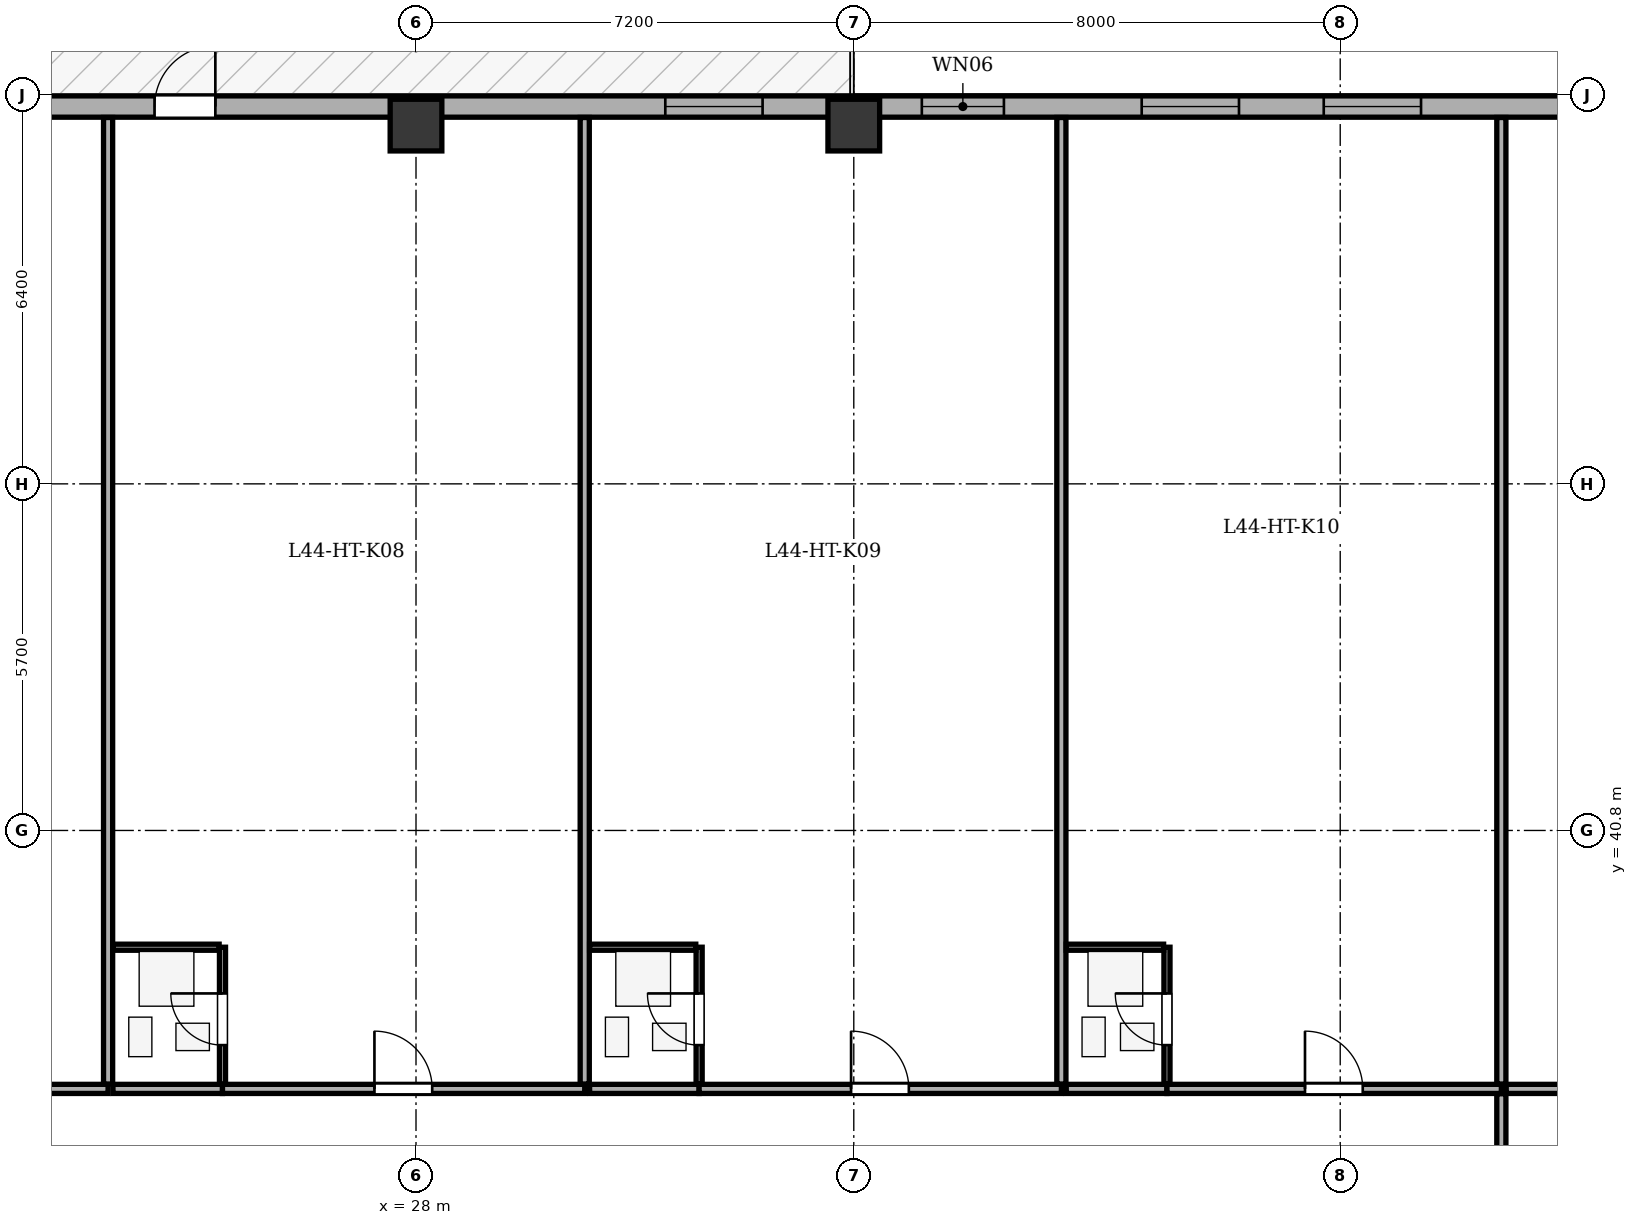
"""IFC4 building model, lengths in metres.
Left out: names, types, materials, properties, quantities, classifications, styles, units other than length and angle.
Written with IfcOpenShell. Run it as: python <this file> out.ifc"""

import sys

from ifc_helpers import new_model, si_unit, direction, frame, frame_2d, origin, origin_2d, place, context, subcontext, project, spatial, rectangle, extrude, element, fill, save


model = new_model("IFC4")
c1 = context("Model", 3, precision=1e-05, world=origin(), true_north=direction((0.0, 1.0)))
c2 = subcontext(c1, "Body", "Model", "MODEL_VIEW")
j1 = project(units=[si_unit("LENGTHUNIT", "METRE"), si_unit("PLANEANGLEUNIT", "RADIAN")], contexts=[c1])
p1 = place(None, origin())
s1 = spatial("IfcSite", under=j1, at=p1, CompositionType="ELEMENT")
p2 = place(p1, origin())
s2 = spatial("IfcBuilding", under=s1, at=p2, CompositionType="ELEMENT")
p3 = place(p2, frame((0.0, 0.0, 172.8)))
s3 = spatial("IfcBuildingStorey", under=s2, at=p3, CompositionType="ELEMENT", Elevation=172.8)
for number, where, z_axis, x_axis in (
    (1, (28.0, 52.4, 0.0), (0.0, 0.0, 1.0), (1.0, 0.0, 0.0)),
    (2, (35.2, 52.4, 0.0), (0.0, 0.0, 1.0), (1.0, 0.0, 0.0)),
):
    element("IfcColumn", number, at=place(p3, frame(where, z_axis=z_axis, x_axis=x_axis)), inside=s3, PredefinedType="COLUMN", context=c2, shape_type="SweptSolid", body=[
        extrude(rectangle(XDim=0.85, YDim=0.85, at=origin_2d()), origin(), (0.0, 0.0, 1.0), 3.5),
    ])
p4 = place(p3, frame((15.7, 52.705, 0.0), z_axis=(0.0, 0.0, 1.0), x_axis=(1.0, 0.0, 0.0)))
e3 = element("IfcWall", 3, at=p4, inside=s3, PredefinedType="STANDARD", context=c2, shape_type="SweptSolid", body=[
    extrude(rectangle(XDim=35.0, YDim=0.35, at=frame_2d((17.5, 0.0))), origin(), (0.0, 0.0, 1.0), 2.785),
])
p5 = place(p4, frame((8.0, 0.0, 0.0)))
e4 = element("IfcOpeningElement", 4, at=p5, cuts=e3, PredefinedType="OPENING", context=c2, shape_type="SweptSolid", body=[
    extrude(rectangle(XDim=1.0, YDim=2.02, at=frame_2d((0.5, 1.01))), frame((0.0, 0.185, 0.0), z_axis=(0.0, -1.0, 0.0), x_axis=(1.0, 0.0, 0.0)), (0.0, 0.0, 1.0), 0.37),
])
p6 = place(p4, frame((1.8, 0.0, 0.75)))
e5 = element("IfcOpeningElement", 5, at=p6, cuts=e3, PredefinedType="OPENING", context=c2, shape_type="SweptSolid", body=[
    extrude(rectangle(XDim=1.6, YDim=1.75, at=frame_2d((0.8, 0.875))), frame((0.0, 0.185, 0.0), z_axis=(0.0, -1.0, 0.0), x_axis=(1.0, 0.0, 0.0)), (0.0, 0.0, 1.0), 0.37),
])
p7 = place(p4, frame((16.4, 0.0, 0.75)))
e6 = element("IfcOpeningElement", 6, at=p7, cuts=e3, PredefinedType="OPENING", context=c2, shape_type="SweptSolid", body=[
    extrude(rectangle(XDim=1.6, YDim=1.75, at=frame_2d((0.8, 0.875))), frame((0.0, 0.185, 0.0), z_axis=(0.0, -1.0, 0.0), x_axis=(1.0, 0.0, 0.0)), (0.0, 0.0, 1.0), 0.37),
])
p8 = place(p4, frame((20.619, 0.0, 0.75)))
e7 = element("IfcOpeningElement", 7, at=p8, cuts=e3, PredefinedType="OPENING", context=c2, shape_type="SweptSolid", body=[
    extrude(rectangle(XDim=1.35, YDim=1.75, at=frame_2d((0.675, 0.875))), frame((0.0, 0.185, 0.0), z_axis=(0.0, -1.0, 0.0), x_axis=(1.0, 0.0, 0.0)), (0.0, 0.0, 1.0), 0.37),
])
p9 = place(p4, frame((24.235, 0.0, 0.75)))
e8 = element("IfcOpeningElement", 8, at=p9, cuts=e3, PredefinedType="OPENING", context=c2, shape_type="SweptSolid", body=[
    extrude(rectangle(XDim=1.6, YDim=1.75, at=frame_2d((0.8, 0.875))), frame((0.0, 0.185, 0.0), z_axis=(0.0, -1.0, 0.0), x_axis=(1.0, 0.0, 0.0)), (0.0, 0.0, 1.0), 0.37),
])
p10 = place(p4, frame((27.229, 0.0, 0.75)))
e9 = element("IfcOpeningElement", 9, at=p10, cuts=e3, PredefinedType="OPENING", context=c2, shape_type="SweptSolid", body=[
    extrude(rectangle(XDim=1.6, YDim=1.75, at=frame_2d((0.8, 0.875))), frame((0.0, 0.185, 0.0), z_axis=(0.0, -1.0, 0.0), x_axis=(1.0, 0.0, 0.0)), (0.0, 0.0, 1.0), 0.37),
])
p11 = place(p4, frame((31.637, 0.0, 0.75)))
e10 = element("IfcOpeningElement", 10, at=p11, cuts=e3, PredefinedType="OPENING", context=c2, shape_type="SweptSolid", body=[
    extrude(rectangle(XDim=1.6, YDim=1.75, at=frame_2d((0.8, 0.875))), frame((0.0, 0.185, 0.0), z_axis=(0.0, -1.0, 0.0), x_axis=(1.0, 0.0, 0.0)), (0.0, 0.0, 1.0), 0.37),
])
p12 = place(p3, frame((17.437, 36.55, 0.0), z_axis=(0.0, 0.0, 1.0), x_axis=(1.0, 0.0, 0.0)))
e11 = element("IfcWall", 11, at=p12, inside=s3, PredefinedType="PARTITIONING", context=c2, shape_type="SweptSolid", body=[
    extrude(rectangle(XDim=5.5, YDim=0.15, at=frame_2d((2.75, 0.0))), origin(), (0.0, 0.0, 1.0), 3.2),
])
p13 = place(p12, frame((2.27, 0.0, 0.0)))
e12 = element("IfcOpeningElement", 12, at=p13, cuts=e11, PredefinedType="OPENING", context=c2, shape_type="SweptSolid", body=[
    extrude(rectangle(XDim=0.95, YDim=2.1, at=frame_2d((0.475, 1.05))), frame((0.0, 0.085, 0.0), z_axis=(0.0, -1.0, 0.0), x_axis=(1.0, 0.0, 0.0)), (0.0, 0.0, 1.0), 0.17),
])
p14 = place(p3, frame((22.936, 36.63, 0.0), z_axis=(0.0, 0.0, 1.0), x_axis=(0.0, 1.0, 0.0)))
e13 = element("IfcWall", 13, at=p14, inside=s3, PredefinedType="PARTITIONING", context=c2, shape_type="SweptSolid", body=[
    extrude(rectangle(XDim=15.895, YDim=0.15, at=frame_2d((7.948, 0.0))), origin(), (0.0, 0.0, 1.0), 3.2),
])
p15 = place(p3, frame((23.016, 36.55, 0.0), z_axis=(0.0, 0.0, 1.0), x_axis=(1.0, 0.0, 0.0)))
e14 = element("IfcWall", 14, at=p15, inside=s3, PredefinedType="PARTITIONING", context=c2, shape_type="SweptSolid", body=[
    extrude(rectangle(XDim=1.801, YDim=0.15, at=frame_2d((0.901, 0.0))), origin(), (0.0, 0.0, 1.0), 3.2),
])
p16 = place(p3, frame((24.817, 36.55, 0.0), z_axis=(0.0, 0.0, 1.0), x_axis=(1.0, 0.0, 0.0)))
e15 = element("IfcWall", 15, at=p16, inside=s3, PredefinedType="PARTITIONING", context=c2, shape_type="SweptSolid", body=[
    extrude(rectangle(XDim=5.958, YDim=0.15, at=frame_2d((2.979, 0.0))), origin(), (0.0, 0.0, 1.0), 3.2),
])
p17 = place(p16, frame((2.499, 0.0, 0.0)))
e16 = element("IfcOpeningElement", 16, at=p17, cuts=e15, PredefinedType="OPENING", context=c2, shape_type="SweptSolid", body=[
    extrude(rectangle(XDim=0.95, YDim=2.1, at=frame_2d((0.475, 1.05))), frame((0.0, 0.085, 0.0), z_axis=(0.0, -1.0, 0.0), x_axis=(1.0, 0.0, 0.0)), (0.0, 0.0, 1.0), 0.17),
])
p18 = place(p3, frame((24.817, 36.63, 0.0), z_axis=(0.0, 0.0, 1.0), x_axis=(0.0, 1.0, 0.0)))
e17 = element("IfcWall", 17, at=p18, inside=s3, PredefinedType="PARTITIONING", context=c2, shape_type="SweptSolid", body=[
    extrude(rectangle(XDim=2.25, YDim=0.1, at=frame_2d((1.125, 0.0))), origin(), (0.0, 0.0, 1.0), 3.2),
])
p19 = place(p18, frame((0.64, 0.0, 0.0)))
e18 = element("IfcOpeningElement", 18, at=p19, cuts=e17, PredefinedType="OPENING", context=c2, shape_type="SweptSolid", body=[
    extrude(rectangle(XDim=0.85, YDim=2.05, at=frame_2d((0.425, 1.025))), frame((0.0, 0.06, 0.0), z_axis=(0.0, -1.0, 0.0), x_axis=(1.0, 0.0, 0.0)), (0.0, 0.0, 1.0), 0.12),
])
p20 = place(p3, frame((23.016, 38.88, 0.0), z_axis=(0.0, 0.0, 1.0), x_axis=(1.0, 0.0, 0.0)))
e19 = element("IfcWall", 19, at=p20, inside=s3, PredefinedType="PARTITIONING", context=c2, shape_type="SweptSolid", body=[
    extrude(rectangle(XDim=1.746, YDim=0.1, at=frame_2d((0.873, 0.0))), origin(), (0.0, 0.0, 1.0), 3.2),
])
p21 = place(p3, frame((30.775, 36.63, 0.0), z_axis=(0.0, 0.0, 1.0), x_axis=(0.0, 1.0, 0.0)))
e20 = element("IfcWall", 20, at=p21, inside=s3, PredefinedType="PARTITIONING", context=c2, shape_type="SweptSolid", body=[
    extrude(rectangle(XDim=15.895, YDim=0.15, at=frame_2d((7.948, 0.0))), origin(), (0.0, 0.0, 1.0), 3.2),
])
p22 = place(p3, frame((30.855, 36.55, 0.0), z_axis=(0.0, 0.0, 1.0), x_axis=(1.0, 0.0, 0.0)))
e21 = element("IfcWall", 21, at=p22, inside=s3, PredefinedType="PARTITIONING", context=c2, shape_type="SweptSolid", body=[
    extrude(rectangle(XDim=1.802, YDim=0.15, at=frame_2d((0.901, 0.0))), origin(), (0.0, 0.0, 1.0), 3.2),
])
p23 = place(p3, frame((32.656, 36.55, 0.0), z_axis=(0.0, 0.0, 1.0), x_axis=(1.0, 0.0, 0.0)))
e22 = element("IfcWall", 22, at=p23, inside=s3, PredefinedType="PARTITIONING", context=c2, shape_type="SweptSolid", body=[
    extrude(rectangle(XDim=5.958, YDim=0.15, at=frame_2d((2.979, 0.0))), origin(), (0.0, 0.0, 1.0), 3.2),
])
p24 = place(p23, frame((2.499, 0.0, 0.0)))
e23 = element("IfcOpeningElement", 23, at=p24, cuts=e22, PredefinedType="OPENING", context=c2, shape_type="SweptSolid", body=[
    extrude(rectangle(XDim=0.95, YDim=2.1, at=frame_2d((0.475, 1.05))), frame((0.0, 0.085, 0.0), z_axis=(0.0, -1.0, 0.0), x_axis=(1.0, 0.0, 0.0)), (0.0, 0.0, 1.0), 0.17),
])
p25 = place(p3, frame((32.656, 36.63, 0.0), z_axis=(0.0, 0.0, 1.0), x_axis=(0.0, 1.0, 0.0)))
e24 = element("IfcWall", 24, at=p25, inside=s3, PredefinedType="PARTITIONING", context=c2, shape_type="SweptSolid", body=[
    extrude(rectangle(XDim=2.25, YDim=0.1, at=frame_2d((1.125, 0.0))), origin(), (0.0, 0.0, 1.0), 3.2),
])
p26 = place(p25, frame((0.64, 0.0, 0.0)))
e25 = element("IfcOpeningElement", 25, at=p26, cuts=e24, PredefinedType="OPENING", context=c2, shape_type="SweptSolid", body=[
    extrude(rectangle(XDim=0.85, YDim=2.05, at=frame_2d((0.425, 1.025))), frame((0.0, 0.06, 0.0), z_axis=(0.0, -1.0, 0.0), x_axis=(1.0, 0.0, 0.0)), (0.0, 0.0, 1.0), 0.12),
])
p27 = place(p3, frame((30.855, 38.88, 0.0), z_axis=(0.0, 0.0, 1.0), x_axis=(1.0, 0.0, 0.0)))
e26 = element("IfcWall", 26, at=p27, inside=s3, PredefinedType="PARTITIONING", context=c2, shape_type="SweptSolid", body=[
    extrude(rectangle(XDim=1.746, YDim=0.1, at=frame_2d((0.873, 0.0))), origin(), (0.0, 0.0, 1.0), 3.2),
])
p28 = place(p3, frame((38.614, 36.63, 0.0), z_axis=(0.0, 0.0, 1.0), x_axis=(0.0, 1.0, 0.0)))
e27 = element("IfcWall", 27, at=p28, inside=s3, PredefinedType="PARTITIONING", context=c2, shape_type="SweptSolid", body=[
    extrude(rectangle(XDim=15.895, YDim=0.15, at=frame_2d((7.948, 0.0))), origin(), (0.0, 0.0, 1.0), 3.2),
])
p29 = place(p3, frame((38.694, 36.55, 0.0), z_axis=(0.0, 0.0, 1.0), x_axis=(1.0, 0.0, 0.0)))
e28 = element("IfcWall", 28, at=p29, inside=s3, PredefinedType="PARTITIONING", context=c2, shape_type="SweptSolid", body=[
    extrude(rectangle(XDim=1.656, YDim=0.15, at=frame_2d((0.828, 0.0))), origin(), (0.0, 0.0, 1.0), 3.2),
])
p30 = place(p3, frame((40.351, 36.55, 0.0), z_axis=(0.0, 0.0, 1.0), x_axis=(1.0, 0.0, 0.0)))
e29 = element("IfcWall", 29, at=p30, inside=s3, PredefinedType="PARTITIONING", context=c2, shape_type="SweptSolid", body=[
    extrude(rectangle(XDim=5.5, YDim=0.15, at=frame_2d((2.75, 0.0))), origin(), (0.0, 0.0, 1.0), 3.2),
])
p31 = place(p30, frame((2.27, 0.0, 0.0)))
e30 = element("IfcOpeningElement", 30, at=p31, cuts=e29, PredefinedType="OPENING", context=c2, shape_type="SweptSolid", body=[
    extrude(rectangle(XDim=0.95, YDim=2.1, at=frame_2d((0.475, 1.05))), frame((0.0, 0.085, 0.0), z_axis=(0.0, -1.0, 0.0), x_axis=(1.0, 0.0, 0.0)), (0.0, 0.0, 1.0), 0.17),
])
p32 = place(p3, frame((40.351, 36.63, 0.0), z_axis=(0.0, 0.0, 1.0), x_axis=(0.0, 1.0, 0.0)))
e31 = element("IfcWall", 31, at=p32, inside=s3, PredefinedType="PARTITIONING", context=c2, shape_type="SweptSolid", body=[
    extrude(rectangle(XDim=2.25, YDim=0.1, at=frame_2d((1.125, 0.0))), origin(), (0.0, 0.0, 1.0), 3.2),
])
p33 = place(p32, frame((0.64, 0.0, 0.0)))
e32 = element("IfcOpeningElement", 32, at=p33, cuts=e31, PredefinedType="OPENING", context=c2, shape_type="SweptSolid", body=[
    extrude(rectangle(XDim=0.85, YDim=2.05, at=frame_2d((0.425, 1.025))), frame((0.0, 0.06, 0.0), z_axis=(0.0, -1.0, 0.0), x_axis=(1.0, 0.0, 0.0)), (0.0, 0.0, 1.0), 0.12),
])
p34 = place(p3, frame((38.694, 38.88, 0.0), z_axis=(0.0, 0.0, 1.0), x_axis=(1.0, 0.0, 0.0)))
e33 = element("IfcWall", 33, at=p34, inside=s3, PredefinedType="PARTITIONING", context=c2, shape_type="SweptSolid", body=[
    extrude(rectangle(XDim=1.602, YDim=0.1, at=frame_2d((0.801, 0.0))), origin(), (0.0, 0.0, 1.0), 3.2),
])
p35 = place(p3, frame((45.85, 36.63, 0.0), z_axis=(0.0, 0.0, 1.0), x_axis=(0.0, 1.0, 0.0)))
e34 = element("IfcWall", 34, at=p35, inside=s3, PredefinedType="PARTITIONING", context=c2, shape_type="SweptSolid", body=[
    extrude(rectangle(XDim=15.895, YDim=0.15, at=frame_2d((7.948, 0.0))), origin(), (0.0, 0.0, 1.0), 3.2),
])
p36 = place(p3, frame((45.93, 36.55, 0.0), z_axis=(0.0, 0.0, 1.0), x_axis=(1.0, 0.0, 0.0)))
e35 = element("IfcWall", 35, at=p36, inside=s3, PredefinedType="PARTITIONING", context=c2, shape_type="SweptSolid", body=[
    extrude(rectangle(XDim=9.395, YDim=0.15, at=frame_2d((4.698, 0.0))), origin(), (0.0, 0.0, 1.0), 3.2),
])
p37 = place(p3, frame((45.85, 30.08, 0.0), z_axis=(0.0, 0.0, 1.0), x_axis=(0.0, 1.0, 0.0)))
e36 = element("IfcWall", 36, at=p37, inside=s3, PredefinedType="PARTITIONING", context=c2, shape_type="SweptSolid", body=[
    extrude(rectangle(XDim=6.39, YDim=0.15, at=frame_2d((3.195, 0.0))), origin(), (0.0, 0.0, 1.0), 3.2),
])
p38 = place(p37, frame((2.715, 0.0, 0.0)))
e37 = element("IfcOpeningElement", 37, at=p38, cuts=e36, PredefinedType="OPENING", context=c2, shape_type="SweptSolid", body=[
    extrude(rectangle(XDim=0.95, YDim=2.1, at=frame_2d((0.475, 1.05))), frame((0.0, 0.085, 0.0), z_axis=(0.0, -1.0, 0.0), x_axis=(1.0, 0.0, 0.0)), (0.0, 0.0, 1.0), 0.17),
])
p39 = place(p5, origin())
e38 = element("IfcDoor", 38, at=p39, inside=s3, OperationType="SINGLE_SWING_RIGHT", PredefinedType="DOOR", context=c2, shape_type="SweptSolid", body=[
    extrude(rectangle(XDim=1.0, YDim=2.02, at=frame_2d((0.5, 1.01))), frame((0.0, 0.025, 0.0), z_axis=(0.0, -1.0, 0.0), x_axis=(1.0, 0.0, 0.0)), (0.0, 0.0, 1.0), 0.05),
])
fill(e4, e38)
p40 = place(p7, origin())
e39 = element("IfcWindow", 39, at=p40, inside=s3, PartitioningType="SINGLE_PANEL", PredefinedType="WINDOW", context=c2, shape_type="SweptSolid", body=[
    extrude(rectangle(XDim=1.6, YDim=1.75, at=frame_2d((0.8, 0.875))), frame((0.0, -0.01, 0.0), z_axis=(0.0, -1.0, 0.0), x_axis=(1.0, 0.0, 0.0)), (0.0, 0.0, 1.0), 0.06),
])
fill(e6, e39)
p41 = place(p8, origin())
e40 = element("IfcWindow", 40, at=p41, inside=s3, PartitioningType="SINGLE_PANEL", PredefinedType="WINDOW", context=c2, shape_type="SweptSolid", body=[
    extrude(rectangle(XDim=1.35, YDim=1.75, at=frame_2d((0.675, 0.875))), frame((0.0, -0.01, 0.0), z_axis=(0.0, -1.0, 0.0), x_axis=(1.0, 0.0, 0.0)), (0.0, 0.0, 1.0), 0.06),
])
fill(e7, e40)
p42 = place(p9, origin())
e41 = element("IfcWindow", 41, at=p42, inside=s3, PartitioningType="SINGLE_PANEL", PredefinedType="WINDOW", context=c2, shape_type="SweptSolid", body=[
    extrude(rectangle(XDim=1.6, YDim=1.75, at=frame_2d((0.8, 0.875))), frame((0.0, -0.01, 0.0), z_axis=(0.0, -1.0, 0.0), x_axis=(1.0, 0.0, 0.0)), (0.0, 0.0, 1.0), 0.06),
])
fill(e8, e41)
p43 = place(p10, origin())
e42 = element("IfcWindow", 42, at=p43, inside=s3, PartitioningType="SINGLE_PANEL", PredefinedType="WINDOW", context=c2, shape_type="SweptSolid", body=[
    extrude(rectangle(XDim=1.6, YDim=1.75, at=frame_2d((0.8, 0.875))), frame((0.0, -0.01, 0.0), z_axis=(0.0, -1.0, 0.0), x_axis=(1.0, 0.0, 0.0)), (0.0, 0.0, 1.0), 0.06),
])
fill(e9, e42)
p44 = place(p19, origin())
e43 = element("IfcDoor", 43, at=p44, inside=s3, OperationType="SINGLE_SWING_RIGHT", PredefinedType="DOOR", context=c2, shape_type="SweptSolid", body=[
    extrude(rectangle(XDim=0.85, YDim=2.05, at=frame_2d((0.425, 1.025))), frame((0.0, 0.025, 0.0), z_axis=(0.0, -1.0, 0.0), x_axis=(1.0, 0.0, 0.0)), (0.0, 0.0, 1.0), 0.05),
])
fill(e18, e43)
p45 = place(p17, origin())
e44 = element("IfcDoor", 44, at=p45, inside=s3, OperationType="SINGLE_SWING_LEFT", PredefinedType="DOOR", context=c2, shape_type="SweptSolid", body=[
    extrude(rectangle(XDim=0.95, YDim=2.1, at=frame_2d((0.475, 1.05))), frame((0.0, 0.025, 0.0), z_axis=(0.0, -1.0, 0.0), x_axis=(1.0, 0.0, 0.0)), (0.0, 0.0, 1.0), 0.05),
])
fill(e16, e44)
p46 = place(p26, origin())
e45 = element("IfcDoor", 45, at=p46, inside=s3, OperationType="SINGLE_SWING_RIGHT", PredefinedType="DOOR", context=c2, shape_type="SweptSolid", body=[
    extrude(rectangle(XDim=0.85, YDim=2.05, at=frame_2d((0.425, 1.025))), frame((0.0, 0.025, 0.0), z_axis=(0.0, -1.0, 0.0), x_axis=(1.0, 0.0, 0.0)), (0.0, 0.0, 1.0), 0.05),
])
fill(e25, e45)
p47 = place(p24, origin())
e46 = element("IfcDoor", 46, at=p47, inside=s3, OperationType="SINGLE_SWING_LEFT", PredefinedType="DOOR", context=c2, shape_type="SweptSolid", body=[
    extrude(rectangle(XDim=0.95, YDim=2.1, at=frame_2d((0.475, 1.05))), frame((0.0, 0.025, 0.0), z_axis=(0.0, -1.0, 0.0), x_axis=(1.0, 0.0, 0.0)), (0.0, 0.0, 1.0), 0.05),
])
fill(e23, e46)
p48 = place(p33, origin())
e47 = element("IfcDoor", 47, at=p48, inside=s3, OperationType="SINGLE_SWING_RIGHT", PredefinedType="DOOR", context=c2, shape_type="SweptSolid", body=[
    extrude(rectangle(XDim=0.85, YDim=2.05, at=frame_2d((0.425, 1.025))), frame((0.0, 0.025, 0.0), z_axis=(0.0, -1.0, 0.0), x_axis=(1.0, 0.0, 0.0)), (0.0, 0.0, 1.0), 0.05),
])
fill(e32, e47)
p49 = place(p31, origin())
e48 = element("IfcDoor", 48, at=p49, inside=s3, OperationType="SINGLE_SWING_LEFT", PredefinedType="DOOR", context=c2, shape_type="SweptSolid", body=[
    extrude(rectangle(XDim=0.95, YDim=2.1, at=frame_2d((0.475, 1.05))), frame((0.0, 0.025, 0.0), z_axis=(0.0, -1.0, 0.0), x_axis=(1.0, 0.0, 0.0)), (0.0, 0.0, 1.0), 0.05),
])
fill(e30, e48)
save(model, sys.argv[1])
